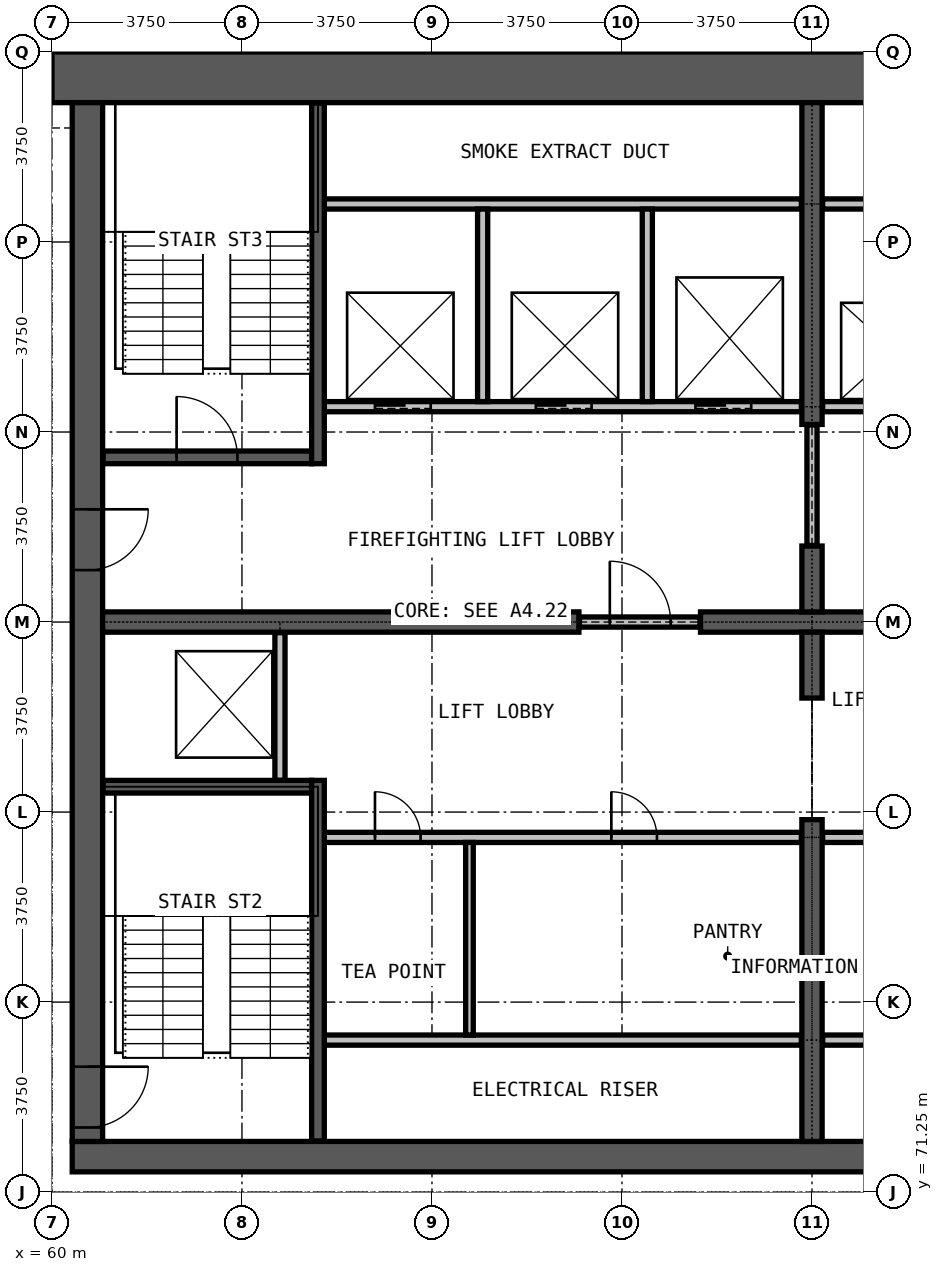
"""IFC4 building model, lengths in metres.
Left out: names, types, materials, properties, quantities, classifications, styles, units other than length and angle.
Written with IfcOpenShell. Run it as: python <this file> out.ifc"""

import sys

from ifc_helpers import new_model, si_unit, direction, frame, frame_2d, origin, place, context, subcontext, project, spatial, rectangle, extrude, element, fill, save


model = new_model("IFC4")
c1 = context("Model", 3, precision=1e-05, world=origin(), true_north=direction((0.0, 1.0)))
c2 = subcontext(c1, "Body", "Model", "MODEL_VIEW")
j1 = project(units=[si_unit("LENGTHUNIT", "METRE"), si_unit("PLANEANGLEUNIT", "RADIAN")], contexts=[c1])
p1 = place(None, origin())
s1 = spatial("IfcSite", under=j1, at=p1, CompositionType="ELEMENT")
p2 = place(p1, origin())
s2 = spatial("IfcBuilding", under=s1, at=p2, CompositionType="ELEMENT")
p3 = place(p2, frame((0.0, 0.0, 192.3)))
s3 = spatial("IfcBuildingStorey", under=s2, at=p3, CompositionType="ELEMENT", Elevation=192.3)
p4 = place(p3, frame((60.4, 71.95, 0.0), z_axis=(0.0, 0.0, 1.0), x_axis=(1.0, 0.0, 0.0)))
e1 = element("IfcWall", 1, at=p4, inside=s3, PredefinedType="SHEAR", context=c2, shape_type="SweptSolid", body=[
    extrude(rectangle(XDim=29.2, YDim=0.6, at=frame_2d((14.6, 0.0))), origin(), (0.0, 0.0, 1.0), 3.6),
])
p5 = place(p3, frame((90.0, 93.25, 0.0), z_axis=(0.0, 0.0, 1.0), x_axis=(-1.0, 0.0, 0.0)))
e2 = element("IfcWall", 2, at=p5, inside=s3, PredefinedType="SHEAR", context=c2, shape_type="SweptSolid", body=[
    extrude(rectangle(XDim=30.0, YDim=1.0, at=frame_2d((15.0, 0.0))), origin(), (0.0, 0.0, 1.0), 3.6),
])
p6 = place(p3, frame((60.7, 92.75, 0.0), z_axis=(0.0, 0.0, 1.0), x_axis=(0.0, -1.0, 0.0)))
e3 = element("IfcWall", 3, at=p6, inside=s3, PredefinedType="SHEAR", context=c2, shape_type="SweptSolid", body=[
    extrude(rectangle(XDim=20.5, YDim=0.6, at=frame_2d((10.25, 0.0))), origin(), (0.0, 0.0, 1.0), 3.6),
])
p7 = place(p6, frame((19.025, 0.0, 0.0)))
e4 = element("IfcOpeningElement", 4, at=p7, cuts=e3, PredefinedType="OPENING", context=c2, shape_type="SweptSolid", body=[
    extrude(rectangle(XDim=1.2, YDim=2.2, at=frame_2d((0.6, 1.1))), frame((0.0, 0.31, 0.0), z_axis=(0.0, -1.0, 0.0), x_axis=(1.0, 0.0, 0.0)), (0.0, 0.0, 1.0), 0.62),
])
p8 = place(p6, frame((8.025, 0.0, 0.0)))
e5 = element("IfcOpeningElement", 5, at=p8, cuts=e3, PredefinedType="OPENING", context=c2, shape_type="SweptSolid", body=[
    extrude(rectangle(XDim=1.2, YDim=2.2, at=frame_2d((0.6, 1.1))), frame((0.0, 0.31, 0.0), z_axis=(0.0, -1.0, 0.0), x_axis=(1.0, 0.0, 0.0)), (0.0, 0.0, 1.0), 0.62),
])
p9 = place(p3, frame((61.0, 82.5, 0.0), z_axis=(0.0, 0.0, 1.0), x_axis=(1.0, 0.0, 0.0)))
e6 = element("IfcWall", 6, at=p9, inside=s3, PredefinedType="SHEAR", context=c2, shape_type="SweptSolid", body=[
    extrude(rectangle(XDim=9.4, YDim=0.4, at=frame_2d((4.7, 0.0))), origin(), (0.0, 0.0, 1.0), 3.6),
])
p10 = place(p3, frame((72.8, 82.5, 0.0), z_axis=(0.0, 0.0, 1.0), x_axis=(1.0, 0.0, 0.0)))
e7 = element("IfcWall", 7, at=p10, inside=s3, PredefinedType="SHEAR", context=c2, shape_type="SweptSolid", body=[
    extrude(rectangle(XDim=4.4, YDim=0.4, at=frame_2d((2.2, 0.0))), origin(), (0.0, 0.0, 1.0), 3.6),
])
p11 = place(p3, frame((75.0, 72.25, 0.0), z_axis=(0.0, 0.0, 1.0), x_axis=(0.0, 1.0, 0.0)))
e8 = element("IfcWall", 8, at=p11, inside=s3, PredefinedType="SHEAR", context=c2, shape_type="SweptSolid", body=[
    extrude(rectangle(XDim=6.35, YDim=0.4, at=frame_2d((3.175, 0.0))), origin(), (0.0, 0.0, 1.0), 3.6),
])
for number, where, z_axis, x_axis in (
    (9, (75.0, 81.0, 0.0), (0.0, 0.0, 1.0), (0.0, 1.0, 0.0)),
    (10, (75.0, 82.7, 0.0), (0.0, 0.0, 1.0), (0.0, 1.0, 0.0)),
):
    element("IfcWall", number, at=place(p3, frame(where, z_axis=z_axis, x_axis=x_axis)), inside=s3, PredefinedType="SHEAR", context=c2, shape_type="SweptSolid", body=[
        extrude(rectangle(XDim=1.3, YDim=0.4, at=frame_2d((0.65, 0.0))), origin(), (0.0, 0.0, 1.0), 3.6),
    ])
p12 = place(p3, frame((75.0, 86.4, 0.0), z_axis=(0.0, 0.0, 1.0), x_axis=(0.0, 1.0, 0.0)))
e11 = element("IfcWall", 11, at=p12, inside=s3, PredefinedType="SHEAR", context=c2, shape_type="SweptSolid", body=[
    extrude(rectangle(XDim=6.35, YDim=0.4, at=frame_2d((3.175, 0.0))), origin(), (0.0, 0.0, 1.0), 3.6),
])
for number, where, z_axis, x_axis in (
    (12, (65.375, 74.25, 0.0), (0.0, 0.0, 1.0), (1.0, 0.0, 0.0)),
    (13, (75.21, 74.25, 0.0), (0.0, 0.0, 1.0), (1.0, 0.0, 0.0)),
):
    element("IfcWall", number, at=place(p3, frame(where, z_axis=z_axis, x_axis=x_axis)), inside=s3, PredefinedType="PARTITIONING", context=c2, shape_type="SweptSolid", body=[
        extrude(rectangle(XDim=9.415, YDim=0.2, at=frame_2d((4.708, 0.0))), origin(), (0.0, 0.0, 1.0), 3.3),
    ])
p13 = place(p3, frame((65.375, 78.25, 0.0), z_axis=(0.0, 0.0, 1.0), x_axis=(1.0, 0.0, 0.0)))
e14 = element("IfcWall", 14, at=p13, inside=s3, PredefinedType="PARTITIONING", context=c2, shape_type="SweptSolid", body=[
    extrude(rectangle(XDim=9.415, YDim=0.2, at=frame_2d((4.708, 0.0))), origin(), (0.0, 0.0, 1.0), 3.3),
])
p14 = place(p13, frame((1.0, 0.0, 0.0)))
e15 = element("IfcOpeningElement", 15, at=p14, cuts=e14, PredefinedType="OPENING", context=c2, shape_type="SweptSolid", body=[
    extrude(rectangle(XDim=0.9, YDim=2.2, at=frame_2d((0.45, 1.1))), frame((0.0, 0.11, 0.0), z_axis=(0.0, -1.0, 0.0), x_axis=(1.0, 0.0, 0.0)), (0.0, 0.0, 1.0), 0.22),
])
p15 = place(p13, frame((5.665, 0.0, 0.0)))
e16 = element("IfcOpeningElement", 16, at=p15, cuts=e14, PredefinedType="OPENING", context=c2, shape_type="SweptSolid", body=[
    extrude(rectangle(XDim=0.9, YDim=2.2, at=frame_2d((0.45, 1.1))), frame((0.0, 0.11, 0.0), z_axis=(0.0, -1.0, 0.0), x_axis=(1.0, 0.0, 0.0)), (0.0, 0.0, 1.0), 0.22),
])
p16 = place(p3, frame((75.21, 78.25, 0.0), z_axis=(0.0, 0.0, 1.0), x_axis=(1.0, 0.0, 0.0)))
e17 = element("IfcWall", 17, at=p16, inside=s3, PredefinedType="PARTITIONING", context=c2, shape_type="SweptSolid", body=[
    extrude(rectangle(XDim=9.415, YDim=0.2, at=frame_2d((4.708, 0.0))), origin(), (0.0, 0.0, 1.0), 3.3),
])
p17 = place(p16, frame((1.9, 0.0, 0.0)))
e18 = element("IfcOpeningElement", 18, at=p17, cuts=e17, PredefinedType="OPENING", context=c2, shape_type="SweptSolid", body=[
    extrude(rectangle(XDim=0.9, YDim=2.2, at=frame_2d((0.45, 1.1))), frame((0.0, 0.11, 0.0), z_axis=(0.0, -1.0, 0.0), x_axis=(1.0, 0.0, 0.0)), (0.0, 0.0, 1.0), 0.22),
])
p18 = place(p16, frame((6.565, 0.0, 0.0)))
e19 = element("IfcOpeningElement", 19, at=p18, cuts=e17, PredefinedType="OPENING", context=c2, shape_type="SweptSolid", body=[
    extrude(rectangle(XDim=0.9, YDim=2.2, at=frame_2d((0.45, 1.1))), frame((0.0, 0.11, 0.0), z_axis=(0.0, -1.0, 0.0), x_axis=(1.0, 0.0, 0.0)), (0.0, 0.0, 1.0), 0.22),
])
p19 = place(p3, frame((70.41, 82.5, 0.0), z_axis=(0.0, 0.0, 1.0), x_axis=(1.0, 0.0, 0.0)))
e20 = element("IfcWall", 20, at=p19, inside=s3, PredefinedType="PARTITIONING", context=c2, shape_type="SweptSolid", body=[
    extrude(rectangle(XDim=2.38, YDim=0.2, at=frame_2d((1.19, 0.0))), origin(), (0.0, 0.0, 1.0), 2.4),
])
p20 = place(p19, frame((0.6, 0.0, 0.0)))
e21 = element("IfcOpeningElement", 21, at=p20, cuts=e20, PredefinedType="OPENING", context=c2, shape_type="SweptSolid", body=[
    extrude(rectangle(XDim=1.2, YDim=2.2, at=frame_2d((0.6, 1.1))), frame((0.0, 0.11, 0.0), z_axis=(0.0, -1.0, 0.0), x_axis=(1.0, 0.0, 0.0)), (0.0, 0.0, 1.0), 0.22),
])
p21 = place(p3, frame((75.0, 84.01, 0.0), z_axis=(0.0, 0.0, 1.0), x_axis=(0.0, 1.0, 0.0)))
e22 = element("IfcWall", 22, at=p21, inside=s3, PredefinedType="PARTITIONING", context=c2, shape_type="SweptSolid", body=[
    extrude(rectangle(XDim=2.38, YDim=0.2, at=frame_2d((1.19, 0.0))), origin(), (0.0, 0.0, 1.0), 2.4),
])
p22 = place(p3, frame((68.24, 74.35, 0.0), z_axis=(0.0, 0.0, 1.0), x_axis=(0.0, 1.0, 0.0)))
e23 = element("IfcWall", 23, at=p22, inside=s3, PredefinedType="PARTITIONING", context=c2, shape_type="SweptSolid", body=[
    extrude(rectangle(XDim=3.8, YDim=0.15, at=frame_2d((1.9, 0.0))), origin(), (0.0, 0.0, 1.0), 3.3),
])
p23 = place(p3, frame((65.375, 86.75, 0.0), z_axis=(0.0, 0.0, 1.0), x_axis=(1.0, 0.0, 0.0)))
e24 = element("IfcWall", 24, at=p23, inside=s3, PredefinedType="PARTITIONING", context=c2, shape_type="SweptSolid", body=[
    extrude(rectangle(XDim=9.415, YDim=0.2, at=frame_2d((4.708, 0.0))), origin(), (0.0, 0.0, 1.0), 3.3),
])
p24 = place(p23, frame((1.0, 0.0, 0.0)))
e25 = element("IfcOpeningElement", 25, at=p24, cuts=e24, PredefinedType="OPENING", context=c2, shape_type="SweptSolid", body=[
    extrude(rectangle(XDim=1.1, YDim=2.2, at=frame_2d((0.55, 1.1))), frame((0.0, 0.11, 0.0), z_axis=(0.0, -1.0, 0.0), x_axis=(1.0, 0.0, 0.0)), (0.0, 0.0, 1.0), 0.22),
])
p25 = place(p23, frame((4.175, 0.0, 0.0)))
e26 = element("IfcOpeningElement", 26, at=p25, cuts=e24, PredefinedType="OPENING", context=c2, shape_type="SweptSolid", body=[
    extrude(rectangle(XDim=1.1, YDim=2.2, at=frame_2d((0.55, 1.1))), frame((0.0, 0.11, 0.0), z_axis=(0.0, -1.0, 0.0), x_axis=(1.0, 0.0, 0.0)), (0.0, 0.0, 1.0), 0.22),
])
p26 = place(p23, frame((7.325, 0.0, 0.0)))
e27 = element("IfcOpeningElement", 27, at=p26, cuts=e24, PredefinedType="OPENING", context=c2, shape_type="SweptSolid", body=[
    extrude(rectangle(XDim=1.1, YDim=2.2, at=frame_2d((0.55, 1.1))), frame((0.0, 0.11, 0.0), z_axis=(0.0, -1.0, 0.0), x_axis=(1.0, 0.0, 0.0)), (0.0, 0.0, 1.0), 0.22),
])
p27 = place(p3, frame((75.21, 86.75, 0.0), z_axis=(0.0, 0.0, 1.0), x_axis=(1.0, 0.0, 0.0)))
e28 = element("IfcWall", 28, at=p27, inside=s3, PredefinedType="PARTITIONING", context=c2, shape_type="SweptSolid", body=[
    extrude(rectangle(XDim=9.415, YDim=0.2, at=frame_2d((4.708, 0.0))), origin(), (0.0, 0.0, 1.0), 3.3),
])
p28 = place(p27, frame((0.95, 0.0, 0.0)))
e29 = element("IfcOpeningElement", 29, at=p28, cuts=e28, PredefinedType="OPENING", context=c2, shape_type="SweptSolid", body=[
    extrude(rectangle(XDim=1.1, YDim=2.2, at=frame_2d((0.55, 1.1))), frame((0.0, 0.11, 0.0), z_axis=(0.0, -1.0, 0.0), x_axis=(1.0, 0.0, 0.0)), (0.0, 0.0, 1.0), 0.22),
])
p29 = place(p27, frame((4.14, 0.0, 0.0)))
e30 = element("IfcOpeningElement", 30, at=p29, cuts=e28, PredefinedType="OPENING", context=c2, shape_type="SweptSolid", body=[
    extrude(rectangle(XDim=1.1, YDim=2.2, at=frame_2d((0.55, 1.1))), frame((0.0, 0.11, 0.0), z_axis=(0.0, -1.0, 0.0), x_axis=(1.0, 0.0, 0.0)), (0.0, 0.0, 1.0), 0.22),
])
p30 = place(p27, frame((7.29, 0.0, 0.0)))
e31 = element("IfcOpeningElement", 31, at=p30, cuts=e28, PredefinedType="OPENING", context=c2, shape_type="SweptSolid", body=[
    extrude(rectangle(XDim=1.1, YDim=2.2, at=frame_2d((0.55, 1.1))), frame((0.0, 0.11, 0.0), z_axis=(0.0, -1.0, 0.0), x_axis=(1.0, 0.0, 0.0)), (0.0, 0.0, 1.0), 0.22),
])
for number, where, z_axis, x_axis in (
    (32, (65.375, 90.75, 0.0), (0.0, 0.0, 1.0), (1.0, 0.0, 0.0)),
    (33, (75.21, 90.75, 0.0), (0.0, 0.0, 1.0), (1.0, 0.0, 0.0)),
):
    element("IfcWall", number, at=place(p3, frame(where, z_axis=z_axis, x_axis=x_axis)), inside=s3, PredefinedType="PARTITIONING", context=c2, shape_type="SweptSolid", body=[
        extrude(rectangle(XDim=9.415, YDim=0.2, at=frame_2d((4.708, 0.0))), origin(), (0.0, 0.0, 1.0), 3.3),
    ])
p31 = place(p3, frame((64.5, 79.375, 0.0), z_axis=(0.0, 0.0, 1.0), x_axis=(0.0, 1.0, 0.0)))
e34 = element("IfcWall", 34, at=p31, inside=s3, PredefinedType="PARTITIONING", context=c2, shape_type="SweptSolid", body=[
    extrude(rectangle(XDim=2.915, YDim=0.2, at=frame_2d((1.458, 0.0))), origin(), (0.0, 0.0, 1.0), 3.3),
])
for number, where, z_axis, x_axis in (
    (35, (68.5, 86.85, 0.0), (0.0, 0.0, 1.0), (0.0, 1.0, 0.0)),
    (36, (71.75, 86.85, 0.0), (0.0, 0.0, 1.0), (0.0, 1.0, 0.0)),
):
    element("IfcWall", number, at=place(p3, frame(where, z_axis=z_axis, x_axis=x_axis)), inside=s3, PredefinedType="PARTITIONING", context=c2, shape_type="SweptSolid", body=[
        extrude(rectangle(XDim=3.8, YDim=0.2, at=frame_2d((1.9, 0.0))), origin(), (0.0, 0.0, 1.0), 3.3),
    ])
p32 = place(p3, frame((61.01, 79.25, 0.0), z_axis=(0.0, 0.0, 1.0), x_axis=(1.0, 0.0, 0.0)))
e37 = element("IfcWall", 37, at=p32, inside=s3, PredefinedType="PARTITIONING", context=c2, shape_type="SweptSolid", body=[
    extrude(rectangle(XDim=4.115, YDim=0.25, at=frame_2d((2.058, 0.0))), origin(), (0.0, 0.0, 1.0), 3.3),
])
p33 = place(p3, frame((61.01, 85.75, 0.0), z_axis=(0.0, 0.0, 1.0), x_axis=(1.0, 0.0, 0.0)))
e38 = element("IfcWall", 38, at=p33, inside=s3, PredefinedType="PARTITIONING", context=c2, shape_type="SweptSolid", body=[
    extrude(rectangle(XDim=4.115, YDim=0.25, at=frame_2d((2.058, 0.0))), origin(), (0.0, 0.0, 1.0), 3.3),
])
p34 = place(p33, frame((1.45, 0.0, 0.0)))
e39 = element("IfcOpeningElement", 39, at=p34, cuts=e38, PredefinedType="OPENING", context=c2, shape_type="SweptSolid", body=[
    extrude(rectangle(XDim=1.2, YDim=2.2, at=frame_2d((0.6, 1.1))), frame((0.0, 0.135, 0.0), z_axis=(0.0, -1.0, 0.0), x_axis=(1.0, 0.0, 0.0)), (0.0, 0.0, 1.0), 0.27),
])
for number, where, z_axis, x_axis in (
    (40, (65.25, 72.26, 0.0), (0.0, 0.0, 1.0), (0.0, 1.0, 0.0)),
    (41, (65.25, 85.625, 0.0), (0.0, 0.0, 1.0), (0.0, 1.0, 0.0)),
):
    element("IfcWall", number, at=place(p3, frame(where, z_axis=z_axis, x_axis=x_axis)), inside=s3, PredefinedType="PARTITIONING", context=c2, shape_type="SweptSolid", body=[
        extrude(rectangle(XDim=7.115, YDim=0.25, at=frame_2d((3.558, 0.0))), origin(), (0.0, 0.0, 1.0), 3.3),
    ])
p35 = place(p24, origin())
e42 = element("IfcDoor", 42, at=p35, inside=s3, OperationType="DOUBLE_DOOR_SLIDING", PredefinedType="DOOR", context=c2, shape_type="SweptSolid", body=[
    extrude(rectangle(XDim=1.1, YDim=2.2, at=frame_2d((0.55, 1.1))), frame((0.0, 0.025, 0.0), z_axis=(0.0, -1.0, 0.0), x_axis=(1.0, 0.0, 0.0)), (0.0, 0.0, 1.0), 0.05),
])
fill(e25, e42)
p36 = place(p25, origin())
e43 = element("IfcDoor", 43, at=p36, inside=s3, OperationType="DOUBLE_DOOR_SLIDING", PredefinedType="DOOR", context=c2, shape_type="SweptSolid", body=[
    extrude(rectangle(XDim=1.1, YDim=2.2, at=frame_2d((0.55, 1.1))), frame((0.0, 0.025, 0.0), z_axis=(0.0, -1.0, 0.0), x_axis=(1.0, 0.0, 0.0)), (0.0, 0.0, 1.0), 0.05),
])
fill(e26, e43)
p37 = place(p26, origin())
e44 = element("IfcDoor", 44, at=p37, inside=s3, OperationType="DOUBLE_DOOR_SLIDING", PredefinedType="DOOR", context=c2, shape_type="SweptSolid", body=[
    extrude(rectangle(XDim=1.1, YDim=2.2, at=frame_2d((0.55, 1.1))), frame((0.0, 0.025, 0.0), z_axis=(0.0, -1.0, 0.0), x_axis=(1.0, 0.0, 0.0)), (0.0, 0.0, 1.0), 0.05),
])
fill(e27, e44)
p38 = place(p20, origin())
e45 = element("IfcDoor", 45, at=p38, inside=s3, OperationType="SINGLE_SWING_LEFT", PredefinedType="DOOR", context=c2, shape_type="SweptSolid", body=[
    extrude(rectangle(XDim=1.2, YDim=2.2, at=frame_2d((0.6, 1.1))), frame((0.0, 0.025, 0.0), z_axis=(0.0, -1.0, 0.0), x_axis=(1.0, 0.0, 0.0)), (0.0, 0.0, 1.0), 0.05),
])
fill(e21, e45)
p39 = place(p34, origin())
e46 = element("IfcDoor", 46, at=p39, inside=s3, OperationType="SINGLE_SWING_LEFT", PredefinedType="DOOR", context=c2, shape_type="SweptSolid", body=[
    extrude(rectangle(XDim=1.2, YDim=2.2, at=frame_2d((0.6, 1.1))), frame((0.0, 0.025, 0.0), z_axis=(0.0, -1.0, 0.0), x_axis=(1.0, 0.0, 0.0)), (0.0, 0.0, 1.0), 0.05),
])
fill(e39, e46)
p40 = place(p7, origin())
e47 = element("IfcDoor", 47, at=p40, inside=s3, OperationType="SINGLE_SWING_LEFT", PredefinedType="DOOR", context=c2, shape_type="SweptSolid", body=[
    extrude(rectangle(XDim=1.2, YDim=2.2, at=frame_2d((0.6, 1.1))), frame((0.0, 0.025, 0.0), z_axis=(0.0, -1.0, 0.0), x_axis=(1.0, 0.0, 0.0)), (0.0, 0.0, 1.0), 0.05),
])
fill(e4, e47)
p41 = place(p8, origin())
e48 = element("IfcDoor", 48, at=p41, inside=s3, OperationType="SINGLE_SWING_RIGHT", PredefinedType="DOOR", context=c2, shape_type="SweptSolid", body=[
    extrude(rectangle(XDim=1.2, YDim=2.2, at=frame_2d((0.6, 1.1))), frame((0.0, 0.025, 0.0), z_axis=(0.0, -1.0, 0.0), x_axis=(1.0, 0.0, 0.0)), (0.0, 0.0, 1.0), 0.05),
])
fill(e5, e48)
p42 = place(p14, origin())
e49 = element("IfcDoor", 49, at=p42, inside=s3, OperationType="SINGLE_SWING_LEFT", PredefinedType="DOOR", context=c2, shape_type="SweptSolid", body=[
    extrude(rectangle(XDim=0.9, YDim=2.2, at=frame_2d((0.45, 1.1))), frame((0.0, 0.025, 0.0), z_axis=(0.0, -1.0, 0.0), x_axis=(1.0, 0.0, 0.0)), (0.0, 0.0, 1.0), 0.05),
])
fill(e15, e49)
p43 = place(p15, origin())
e50 = element("IfcDoor", 50, at=p43, inside=s3, OperationType="SINGLE_SWING_RIGHT", PredefinedType="DOOR", context=c2, shape_type="SweptSolid", body=[
    extrude(rectangle(XDim=0.9, YDim=2.2, at=frame_2d((0.45, 1.1))), frame((0.0, 0.025, 0.0), z_axis=(0.0, -1.0, 0.0), x_axis=(1.0, 0.0, 0.0)), (0.0, 0.0, 1.0), 0.05),
])
fill(e16, e50)
save(model, sys.argv[1])
